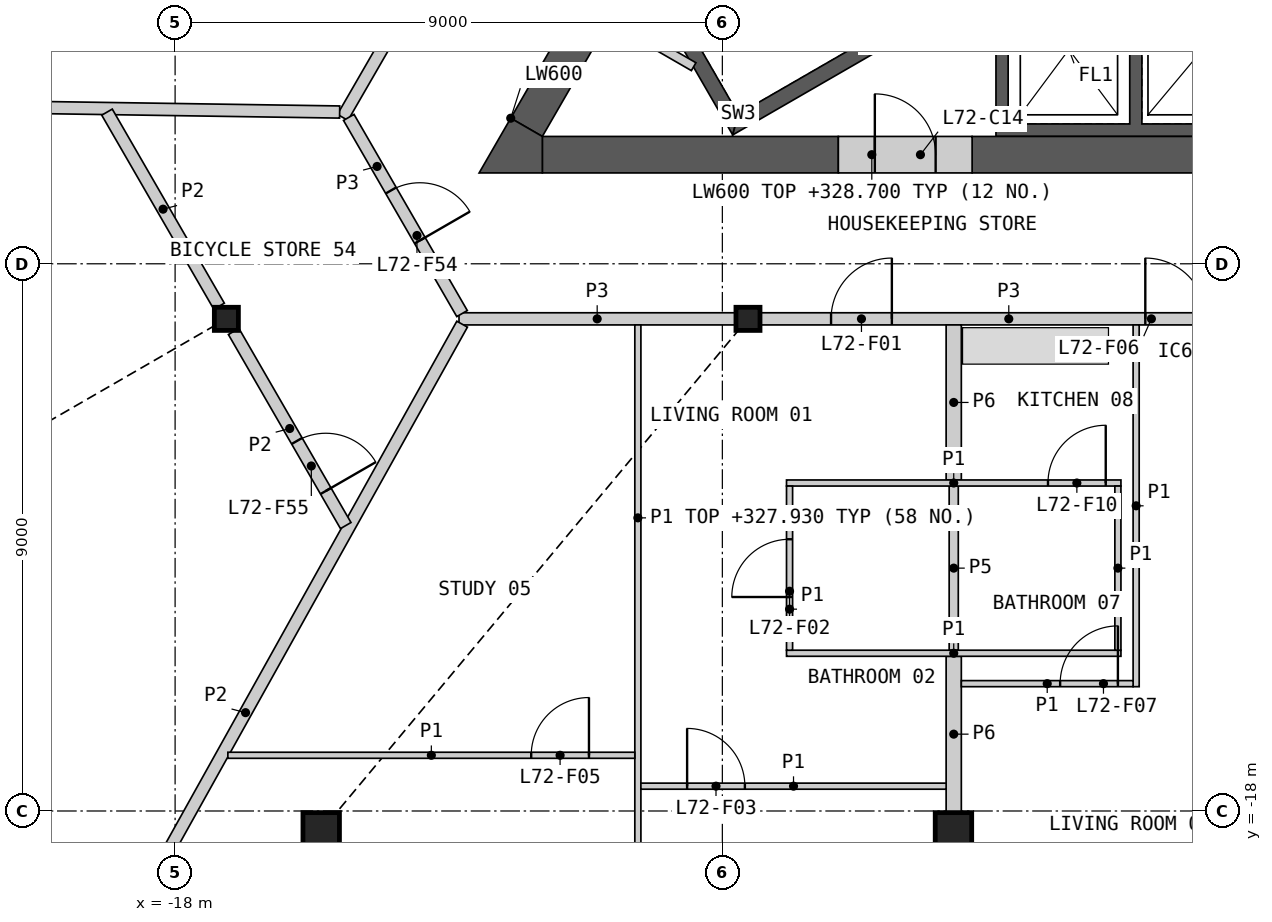
"""IFC4 building model, lengths in metres.
Left out: names, types, materials, properties, quantities, classifications, styles, units other than length and angle.
Written with IfcOpenShell. Run it as: python <this file> out.ifc"""

import sys

from ifc_helpers import new_model, si_unit, direction, frame, frame_2d, origin, origin_2d, place, context, subcontext, project, spatial, polyline, rectangle, hollow_rectangle, i_section, outline, extrude, element, fill, save


model = new_model("IFC4")
c1 = context("Model", 3, precision=1e-05, world=origin(), true_north=direction((0.0, 1.0)))
c2 = subcontext(c1, "Body", "Model", "MODEL_VIEW")
j1 = project(units=[si_unit("LENGTHUNIT", "METRE"), si_unit("PLANEANGLEUNIT", "RADIAN")], contexts=[c1])
p1 = place(None, origin())
s1 = spatial("IfcSite", under=j1, at=p1, CompositionType="ELEMENT")
p2 = place(p1, origin())
s2 = spatial("IfcBuilding", under=s1, at=p2, CompositionType="ELEMENT")
p3 = place(p2, frame((0.0, 0.0, 325.6)))
s3 = spatial("IfcBuildingStorey", under=s2, at=p3, CompositionType="ELEMENT", Elevation=325.6)
for number, where, z_axis, x_axis in (
    (1, (-15.597, -18.327, 0.0), (0.0, 0.0, 1.0), (1.0, 0.0, 0.0)),
    (2, (-5.199, -18.327, 0.0), (0.0, 0.0, 1.0), (1.0, 0.0, 0.0)),
):
    element("IfcColumn", number, at=place(p3, frame(where, z_axis=z_axis, x_axis=x_axis)), inside=s3, PredefinedType="COLUMN", context=c2, shape_type="SweptSolid", body=[
        extrude(hollow_rectangle(XDim=0.6, YDim=0.6, WallThickness=0.04, at=origin_2d()), origin(), (0.0, 0.0, 1.0), 3.4),
    ])
for number, where, z_axis, x_axis in (
    (3, (-17.157, -9.906, 0.0), (0.0, 0.0, 1.0), (1.0, 0.0, 0.0)),
    (4, (-8.578, -9.906, 0.0), (0.0, 0.0, 1.0), (1.0, 0.0, 0.0)),
):
    element("IfcColumn", number, at=place(p3, frame(where, z_axis=z_axis, x_axis=x_axis)), inside=s3, PredefinedType="COLUMN", context=c2, shape_type="SweptSolid", body=[
        extrude(i_section(OverallWidth=0.396, OverallDepth=0.381, WebThickness=0.019, FlangeThickness=0.03, at=origin_2d()), origin(), (0.0, 0.0, 1.0), 3.4),
    ])
p4 = place(p3, origin())
e5 = element("IfcWall", 5, at=p4, inside=s3, PredefinedType="SHEAR", context=c2, shape_type="SweptSolid", body=[
    extrude(outline(polyline([(4.5, -4.4), (4.5, -6.906), (-4.5, -6.906), (-4.5, -4.4), (-4.3, -4.4), (-4.3, -6.7), (-2.3, -6.7), (-2.3, -4.4), (-2.1, -4.4), (-2.1, -6.7), (-0.1, -6.7), (-0.1, -4.4), (0.1, -4.4), (0.1, -6.7), (2.1, -6.7), (2.1, -4.4), (2.3, -4.4), (2.3, -6.7), (4.3, -6.7), (4.3, -4.4), (4.5, -4.4)])), origin(), (0.0, 0.0, 1.0), 3.1),
])
p5 = place(p3, origin())
e6 = element("IfcWall", 6, at=p5, inside=s3, PredefinedType="SHEAR", context=c2, shape_type="SweptSolid", body=[
    extrude(outline(polyline([(-10.374, -4.206), (-8.83, -6.881), (-8.738, -6.539), (-10.032, -4.298), (-10.374, -4.206)])), origin(), (0.0, 0.0, 1.0), 3.1),
])
p6 = place(p3, origin())
e7 = element("IfcWall", 7, at=p6, inside=s3, PredefinedType="SHEAR", context=c2, shape_type="SweptSolid", body=[
    extrude(outline(polyline([(-8.738, -6.539), (-8.83, -6.881), (-3.763, -3.956), (-3.888, -3.739), (-8.738, -6.539)])), origin(), (0.0, 0.0, 1.0), 3.1),
])
p7 = place(p3, frame((-10.842, -4.967, 0.0), z_axis=(0.0, 0.0, 1.0), x_axis=(0.866098216386, -0.499873863663, 0.0)))
e8 = element("IfcWall", 8, at=p7, inside=s3, PredefinedType="PARTITIONING", context=c2, shape_type="SweptSolid", body=[
    extrude(rectangle(XDim=1.582, YDim=0.15, at=frame_2d((0.791, 0.0))), origin(), (0.0, 0.0, 1.0), 3.1),
])
p8 = place(p3, frame((-4.892, -7.206, 0.0), z_axis=(0.0, 0.0, 1.0), x_axis=(1.0, 0.0, 0.0)))
e9 = element("IfcWall", 9, at=p8, inside=s3, PredefinedType="SHEAR", context=c2, shape_type="SweptSolid", body=[
    extrude(rectangle(XDim=16.853, YDim=0.6, at=frame_2d((8.426, 0.0))), origin(), (0.0, 0.0, 1.0), 3.1),
])
p9 = place(p3, frame((-11.961, -7.206, 0.0), z_axis=(0.0, 0.0, 1.0), x_axis=(1.0, 0.0, 0.0)))
e10 = element("IfcWall", 10, at=p9, inside=s3, PredefinedType="SHEAR", context=c2, shape_type="SweptSolid", body=[
    extrude(rectangle(XDim=4.868, YDim=0.6, at=frame_2d((2.434, 0.0))), origin(), (0.0, 0.0, 1.0), 3.1),
])
p10 = place(p3, frame((-9.941, -2.807, 0.0), z_axis=(0.0, 0.0, 1.0), x_axis=(-0.500020646047, -0.866013483456, 0.0)))
e11 = element("IfcWall", 11, at=p10, inside=s3, PredefinedType="SHEAR", context=c2, shape_type="SweptSolid", body=[
    extrude(rectangle(XDim=4.559, YDim=0.6, at=frame_2d((2.28, 0.0))), origin(), (0.0, 0.0, 1.0), 3.1),
])
p11 = place(p3, origin())
e12 = element("IfcWall", 12, at=p11, inside=s3, PredefinedType="SHEAR", context=c2, shape_type="SweptSolid", body=[
    extrude(outline(polyline([(-12.48, -6.606), (-11.961, -6.906), (-11.961, -7.506), (-13.0, -7.506), (-12.48, -6.606)])), origin(), (0.0, 0.0, 1.0), 3.1),
])
p12 = place(p3, frame((-7.092, -7.206, 0.0), z_axis=(0.0, 0.0, 1.0), x_axis=(1.0, 0.0, 0.0)))
e13 = element("IfcWall", 13, at=p12, inside=s3, PredefinedType="SHEAR", context=c2, shape_type="SweptSolid", body=[
    extrude(rectangle(XDim=2.2, YDim=0.6, at=frame_2d((1.1, 0.0))), origin(), (0.0, 0.0, 1.0), 3.1),
])
p13 = place(p12, frame((0.6, 0.0, 0.0)))
e14 = element("IfcOpeningElement", 14, at=p13, cuts=e13, PredefinedType="OPENING", context=c2, shape_type="SweptSolid", body=[
    extrude(rectangle(XDim=1.0, YDim=2.1, at=frame_2d((0.5, 1.05))), frame((0.0, 0.31, 0.0), z_axis=(0.0, -1.0, 0.0), x_axis=(1.0, 0.0, 0.0)), (0.0, 0.0, 1.0), 0.62),
])
p14 = place(p3, frame((-8.371, -9.906, 0.0), z_axis=(0.0, 0.0, 1.0), x_axis=(1.0, 0.0, 0.0)))
e15 = element("IfcWall", 15, at=p14, inside=s3, PredefinedType="PARTITIONING", context=c2, shape_type="SweptSolid", body=[
    extrude(rectangle(XDim=8.163, YDim=0.2, at=frame_2d((4.082, 0.0))), origin(), (0.0, 0.0, 1.0), 3.1),
])
p15 = place(p14, frame((1.159, 0.0, 0.0)))
e16 = element("IfcOpeningElement", 16, at=p15, cuts=e15, PredefinedType="OPENING", context=c2, shape_type="SweptSolid", body=[
    extrude(rectangle(XDim=1.0, YDim=2.1, at=frame_2d((0.5, 1.05))), frame((0.0, 0.11, 0.0), z_axis=(0.0, -1.0, 0.0), x_axis=(1.0, 0.0, 0.0)), (0.0, 0.0, 1.0), 0.22),
])
p16 = place(p14, frame((6.327, 0.0, 0.0)))
e17 = element("IfcOpeningElement", 17, at=p16, cuts=e15, PredefinedType="OPENING", context=c2, shape_type="SweptSolid", body=[
    extrude(rectangle(XDim=1.0, YDim=2.1, at=frame_2d((0.5, 1.05))), frame((0.0, 0.11, 0.0), z_axis=(0.0, -1.0, 0.0), x_axis=(1.0, 0.0, 0.0)), (0.0, 0.0, 1.0), 0.22),
])
p17 = place(p3, frame((-13.331, -9.906, 0.0), z_axis=(0.0, 0.0, 1.0), x_axis=(1.0, 0.0, 0.0)))
e18 = element("IfcWall", 18, at=p17, inside=s3, PredefinedType="PARTITIONING", context=c2, shape_type="SweptSolid", body=[
    extrude(rectangle(XDim=4.545, YDim=0.2, at=frame_2d((2.272, 0.0))), origin(), (0.0, 0.0, 1.0), 3.1),
])
p18 = place(p3, frame((-15.244, -6.592, 0.0), z_axis=(0.0, 0.0, 1.0), x_axis=(0.49999094734, 0.866030630277, 0.0)))
e19 = element("IfcWall", 19, at=p18, inside=s3, PredefinedType="PARTITIONING", context=c2, shape_type="SweptSolid", body=[
    extrude(rectangle(XDim=4.513, YDim=0.2, at=frame_2d((2.256, 0.0))), origin(), (0.0, 0.0, 1.0), 3.1),
])
p19 = place(p3, frame((-15.144, -6.592, 0.0), z_axis=(0.0, 0.0, 1.0), x_axis=(0.499958791762, -0.866049194065, 0.0)))
e20 = element("IfcWall", 20, at=p19, inside=s3, PredefinedType="PARTITIONING", context=c2, shape_type="SweptSolid", body=[
    extrude(rectangle(XDim=3.726, YDim=0.2, at=frame_2d((1.863, 0.0))), origin(), (0.0, 0.0, 1.0), 3.1),
])
p20 = place(p19, frame((1.388, 0.0, 0.0)))
e21 = element("IfcOpeningElement", 21, at=p20, cuts=e20, PredefinedType="OPENING", context=c2, shape_type="SweptSolid", body=[
    extrude(rectangle(XDim=0.95, YDim=2.1, at=frame_2d((0.475, 1.05))), frame((0.0, 0.11, 0.0), z_axis=(0.0, -1.0, 0.0), x_axis=(1.0, 0.0, 0.0)), (0.0, 0.0, 1.0), 0.22),
])
p21 = place(p3, frame((-5.195, -12.556, 0.0), z_axis=(0.0, 0.0, 1.0), x_axis=(0.0, 1.0, 0.0)))
e22 = element("IfcWall", 22, at=p21, inside=s3, PredefinedType="PARTITIONING", context=c2, shape_type="SweptSolid", body=[
    extrude(rectangle(XDim=2.55, YDim=0.25, at=frame_2d((1.275, 0.0))), origin(), (0.0, 0.0, 1.0), 2.33),
])
p22 = place(p3, frame((-5.195, -18.017, 0.0), z_axis=(0.0, 0.0, 1.0), x_axis=(0.0, 1.0, 0.0)))
e23 = element("IfcWall", 23, at=p22, inside=s3, PredefinedType="PARTITIONING", context=c2, shape_type="SweptSolid", body=[
    extrude(rectangle(XDim=2.561, YDim=0.25, at=frame_2d((1.281, 0.0))), origin(), (0.0, 0.0, 1.0), 2.33),
])
p23 = place(p3, frame((-20.404, -22.772, 0.0), z_axis=(0.0, 0.0, 1.0), x_axis=(0.486917529285, 0.873447949036, 0.0)))
e24 = element("IfcWall", 24, at=p23, inside=s3, PredefinedType="PARTITIONING", context=c2, shape_type="SweptSolid", body=[
    extrude(rectangle(XDim=14.631, YDim=0.2, at=frame_2d((7.315, 0.0))), origin(), (0.0, 0.0, 1.0), 2.33),
])
p24 = place(p3, frame((-30.014, -6.282, 0.0), z_axis=(0.0, 0.0, 1.0), x_axis=(0.99988686643, -0.015041753265, 0.0)))
e25 = element("IfcWall", 25, at=p24, inside=s3, PredefinedType="PARTITIONING", context=c2, shape_type="SweptSolid", body=[
    extrude(rectangle(XDim=14.721, YDim=0.2, at=frame_2d((7.361, 0.0))), origin(), (0.0, 0.0, 1.0), 2.33),
])
p25 = place(p3, frame((-17.037, -10.113, 0.0), z_axis=(0.0, 0.0, 1.0), x_axis=(0.50002820729, -0.866009117685, 0.0)))
e26 = element("IfcWall", 26, at=p25, inside=s3, PredefinedType="PARTITIONING", context=c2, shape_type="SweptSolid", body=[
    extrude(rectangle(XDim=3.686, YDim=0.2, at=frame_2d((1.843, 0.0))), origin(), (0.0, 0.0, 1.0), 2.33),
])
p26 = place(p25, frame((2.08, 0.0, 0.0)))
e27 = element("IfcOpeningElement", 27, at=p26, cuts=e26, PredefinedType="OPENING", context=c2, shape_type="SweptSolid", body=[
    extrude(rectangle(XDim=0.95, YDim=2.1, at=frame_2d((0.475, 1.05))), frame((0.0, 0.11, 0.0), z_axis=(0.0, -1.0, 0.0), x_axis=(1.0, 0.0, 0.0)), (0.0, 0.0, 1.0), 0.22),
])
p27 = place(p3, frame((-19.12, -6.506, 0.0), z_axis=(0.0, 0.0, 1.0), x_axis=(0.499978535015, -0.866037796245, 0.0)))
e28 = element("IfcWall", 28, at=p27, inside=s3, PredefinedType="PARTITIONING", context=c2, shape_type="SweptSolid", body=[
    extrude(rectangle(XDim=3.686, YDim=0.2, at=frame_2d((1.843, 0.0))), origin(), (0.0, 0.0, 1.0), 2.33),
])
p28 = place(p3, frame((-5.195, -15.356, 0.0), z_axis=(0.0, 0.0, 1.0), x_axis=(0.0, 1.0, 0.0)))
e29 = element("IfcWall", 29, at=p28, inside=s3, PredefinedType="PLUMBINGWALL", context=c2, shape_type="SweptSolid", body=[
    extrude(rectangle(XDim=2.7, YDim=0.15, at=frame_2d((1.35, 0.0))), origin(), (0.0, 0.0, 1.0), 2.33),
])
p29 = place(p3, frame((-10.389, -22.698, 0.0), z_axis=(0.0, 0.0, 1.0), x_axis=(0.0, 1.0, 0.0)))
e30 = element("IfcWall", 30, at=p29, inside=s3, PredefinedType="PARTITIONING", context=c2, shape_type="SweptSolid", body=[
    extrude(rectangle(XDim=12.692, YDim=0.1, at=frame_2d((6.346, 0.0))), origin(), (0.0, 0.0, 1.0), 2.33),
])
p30 = place(p29, frame((1.153, 0.0, 0.0)))
e31 = element("IfcOpeningElement", 31, at=p30, cuts=e30, PredefinedType="OPENING", context=c2, shape_type="SweptSolid", body=[
    extrude(rectangle(XDim=0.95, YDim=2.1, at=frame_2d((0.475, 1.05))), frame((0.0, 0.06, 0.0), z_axis=(0.0, -1.0, 0.0), x_axis=(1.0, 0.0, 0.0)), (0.0, 0.0, 1.0), 0.12),
])
p31 = place(p3, frame((-23.361, -6.295, 0.0), z_axis=(0.0, 0.0, 1.0), x_axis=(0.499987686533, 0.866032512851, 0.0)))
e32 = element("IfcWall", 32, at=p31, inside=s3, PredefinedType="PARTITIONING", context=c2, shape_type="SweptSolid", body=[
    extrude(rectangle(XDim=6.693, YDim=0.1, at=frame_2d((3.347, 0.0))), origin(), (0.0, 0.0, 1.0), 2.33),
])
p32 = place(p31, frame((3.275, 0.0, 0.0)))
e33 = element("IfcOpeningElement", 33, at=p32, cuts=e32, PredefinedType="OPENING", context=c2, shape_type="SweptSolid", body=[
    extrude(rectangle(XDim=0.95, YDim=2.1, at=frame_2d((0.475, 1.05))), frame((0.0, 0.06, 0.0), z_axis=(0.0, -1.0, 0.0), x_axis=(1.0, 0.0, 0.0)), (0.0, 0.0, 1.0), 0.12),
])
p33 = place(p3, frame((-17.132, -17.084, 0.0), z_axis=(0.0, 0.0, 1.0), x_axis=(1.0, 0.0, 0.0)))
e34 = element("IfcWall", 34, at=p33, inside=s3, PredefinedType="PARTITIONING", context=c2, shape_type="SweptSolid", body=[
    extrude(rectangle(XDim=6.693, YDim=0.1, at=frame_2d((3.346, 0.0))), origin(), (0.0, 0.0, 1.0), 2.33),
])
p34 = place(p33, frame((4.989, 0.0, 0.0)))
e35 = element("IfcOpeningElement", 35, at=p34, cuts=e34, PredefinedType="OPENING", context=c2, shape_type="SweptSolid", body=[
    extrude(rectangle(XDim=0.95, YDim=2.1, at=frame_2d((0.475, 1.05))), frame((0.0, 0.06, 0.0), z_axis=(0.0, -1.0, 0.0), x_axis=(1.0, 0.0, 0.0)), (0.0, 0.0, 1.0), 0.12),
])
p35 = place(p3, frame((-2.195, -15.956, 0.0), z_axis=(0.0, 0.0, 1.0), x_axis=(0.0, 1.0, 0.0)))
e36 = element("IfcWall", 36, at=p35, inside=s3, PredefinedType="PARTITIONING", context=c2, shape_type="SweptSolid", body=[
    extrude(rectangle(XDim=5.95, YDim=0.1, at=frame_2d((2.975, 0.0))), origin(), (0.0, 0.0, 1.0), 2.33),
])
p36 = place(p3, frame((-7.945, -12.606, 0.0), z_axis=(0.0, 0.0, 1.0), x_axis=(1.0, 0.0, 0.0)))
e37 = element("IfcWall", 37, at=p36, inside=s3, PredefinedType="PARTITIONING", context=c2, shape_type="SweptSolid", body=[
    extrude(rectangle(XDim=5.5, YDim=0.1, at=frame_2d((2.75, 0.0))), origin(), (0.0, 0.0, 1.0), 2.33),
])
p37 = place(p36, frame((4.3, 0.0, 0.0)))
e38 = element("IfcOpeningElement", 38, at=p37, cuts=e37, PredefinedType="OPENING", context=c2, shape_type="SweptSolid", body=[
    extrude(rectangle(XDim=0.95, YDim=2.1, at=frame_2d((0.475, 1.05))), frame((0.0, 0.06, 0.0), z_axis=(0.0, -1.0, 0.0), x_axis=(1.0, 0.0, 0.0)), (0.0, 0.0, 1.0), 0.12),
])
p38 = place(p3, frame((-7.945, -15.406, 0.0), z_axis=(0.0, 0.0, 1.0), x_axis=(1.0, 0.0, 0.0)))
e39 = element("IfcWall", 39, at=p38, inside=s3, PredefinedType="PARTITIONING", context=c2, shape_type="SweptSolid", body=[
    extrude(rectangle(XDim=5.5, YDim=0.1, at=frame_2d((2.75, 0.0))), origin(), (0.0, 0.0, 1.0), 2.33),
])
p39 = place(p3, frame((-10.339, -17.592, 0.0), z_axis=(0.0, 0.0, 1.0), x_axis=(1.0, 0.0, 0.0)))
e40 = element("IfcWall", 40, at=p39, inside=s3, PredefinedType="PARTITIONING", context=c2, shape_type="SweptSolid", body=[
    extrude(rectangle(XDim=5.02, YDim=0.1, at=frame_2d((2.51, 0.0))), origin(), (0.0, 0.0, 1.0), 2.33),
])
p40 = place(p39, frame((0.76, 0.0, 0.0)))
e41 = element("IfcOpeningElement", 41, at=p40, cuts=e40, PredefinedType="OPENING", context=c2, shape_type="SweptSolid", body=[
    extrude(rectangle(XDim=0.95, YDim=2.1, at=frame_2d((0.475, 1.05))), frame((0.0, 0.06, 0.0), z_axis=(0.0, -1.0, 0.0), x_axis=(1.0, 0.0, 0.0)), (0.0, 0.0, 1.0), 0.12),
])
p41 = place(p3, frame((-5.07, -15.906, 0.0), z_axis=(0.0, 0.0, 1.0), x_axis=(1.0, 0.0, 0.0)))
e42 = element("IfcWall", 42, at=p41, inside=s3, PredefinedType="PARTITIONING", context=c2, shape_type="SweptSolid", body=[
    extrude(rectangle(XDim=2.825, YDim=0.1, at=frame_2d((1.413, 0.0))), origin(), (0.0, 0.0, 1.0), 2.33),
])
p42 = place(p41, frame((1.625, 0.0, 0.0)))
e43 = element("IfcOpeningElement", 43, at=p42, cuts=e42, PredefinedType="OPENING", context=c2, shape_type="SweptSolid", body=[
    extrude(rectangle(XDim=0.95, YDim=2.1, at=frame_2d((0.475, 1.05))), frame((0.0, 0.06, 0.0), z_axis=(0.0, -1.0, 0.0), x_axis=(1.0, 0.0, 0.0)), (0.0, 0.0, 1.0), 0.12),
])
p43 = place(p3, frame((-7.895, -15.356, 0.0), z_axis=(0.0, 0.0, 1.0), x_axis=(0.0, 1.0, 0.0)))
e44 = element("IfcWall", 44, at=p43, inside=s3, PredefinedType="PARTITIONING", context=c2, shape_type="SweptSolid", body=[
    extrude(rectangle(XDim=2.7, YDim=0.1, at=frame_2d((1.35, 0.0))), origin(), (0.0, 0.0, 1.0), 2.33),
])
p44 = place(p43, frame((0.875, 0.0, 0.0)))
e45 = element("IfcOpeningElement", 45, at=p44, cuts=e44, PredefinedType="OPENING", context=c2, shape_type="SweptSolid", body=[
    extrude(rectangle(XDim=0.95, YDim=2.1, at=frame_2d((0.475, 1.05))), frame((0.0, 0.06, 0.0), z_axis=(0.0, -1.0, 0.0), x_axis=(1.0, 0.0, 0.0)), (0.0, 0.0, 1.0), 0.12),
])
p45 = place(p3, frame((-2.495, -15.356, 0.0), z_axis=(0.0, 0.0, 1.0), x_axis=(0.0, 1.0, 0.0)))
e46 = element("IfcWall", 46, at=p45, inside=s3, PredefinedType="PARTITIONING", context=c2, shape_type="SweptSolid", body=[
    extrude(rectangle(XDim=2.7, YDim=0.1, at=frame_2d((1.35, 0.0))), origin(), (0.0, 0.0, 1.0), 2.33),
])
p46 = place(p13, origin())
e47 = element("IfcDoor", 47, at=p46, inside=s3, OperationType="SINGLE_SWING_LEFT", PredefinedType="DOOR", context=c2, shape_type="SweptSolid", body=[
    extrude(rectangle(XDim=1.0, YDim=2.1, at=frame_2d((0.5, 1.05))), frame((0.0, 0.055, 0.0), z_axis=(0.0, -1.0, 0.0), x_axis=(1.0, 0.0, 0.0)), (0.0, 0.0, 1.0), 0.05),
])
fill(e14, e47)
p47 = place(p15, origin())
e48 = element("IfcDoor", 48, at=p47, inside=s3, OperationType="SINGLE_SWING_RIGHT", PredefinedType="DOOR", context=c2, shape_type="SweptSolid", body=[
    extrude(rectangle(XDim=1.0, YDim=2.1, at=frame_2d((0.5, 1.05))), frame((0.0, 0.025, 0.0), z_axis=(0.0, -1.0, 0.0), x_axis=(1.0, 0.0, 0.0)), (0.0, 0.0, 1.0), 0.05),
])
fill(e16, e48)
p48 = place(p44, origin())
e49 = element("IfcDoor", 49, at=p48, inside=s3, OperationType="SINGLE_SWING_LEFT", PredefinedType="DOOR", context=c2, shape_type="SweptSolid", body=[
    extrude(rectangle(XDim=0.95, YDim=2.1, at=frame_2d((0.475, 1.05))), frame((0.0, 0.025, 0.0), z_axis=(0.0, -1.0, 0.0), x_axis=(1.0, 0.0, 0.0)), (0.0, 0.0, 1.0), 0.05),
])
fill(e45, e49)
p49 = place(p40, origin())
e50 = element("IfcDoor", 50, at=p49, inside=s3, OperationType="SINGLE_SWING_LEFT", PredefinedType="DOOR", context=c2, shape_type="SweptSolid", body=[
    extrude(rectangle(XDim=0.95, YDim=2.1, at=frame_2d((0.475, 1.05))), frame((0.0, 0.025, 0.0), z_axis=(0.0, -1.0, 0.0), x_axis=(1.0, 0.0, 0.0)), (0.0, 0.0, 1.0), 0.05),
])
fill(e41, e50)
p50 = place(p34, origin())
e51 = element("IfcDoor", 51, at=p50, inside=s3, OperationType="SINGLE_SWING_RIGHT", PredefinedType="DOOR", context=c2, shape_type="SweptSolid", body=[
    extrude(rectangle(XDim=0.95, YDim=2.1, at=frame_2d((0.475, 1.05))), frame((0.0, 0.025, 0.0), z_axis=(0.0, -1.0, 0.0), x_axis=(1.0, 0.0, 0.0)), (0.0, 0.0, 1.0), 0.05),
])
fill(e35, e51)
p51 = place(p16, origin())
e52 = element("IfcDoor", 52, at=p51, inside=s3, OperationType="SINGLE_SWING_LEFT", PredefinedType="DOOR", context=c2, shape_type="SweptSolid", body=[
    extrude(rectangle(XDim=1.0, YDim=2.1, at=frame_2d((0.5, 1.05))), frame((0.0, 0.025, 0.0), z_axis=(0.0, -1.0, 0.0), x_axis=(1.0, 0.0, 0.0)), (0.0, 0.0, 1.0), 0.05),
])
fill(e17, e52)
p52 = place(p42, origin())
e53 = element("IfcDoor", 53, at=p52, inside=s3, OperationType="SINGLE_SWING_RIGHT", PredefinedType="DOOR", context=c2, shape_type="SweptSolid", body=[
    extrude(rectangle(XDim=0.95, YDim=2.1, at=frame_2d((0.475, 1.05))), frame((0.0, 0.025, 0.0), z_axis=(0.0, -1.0, 0.0), x_axis=(1.0, 0.0, 0.0)), (0.0, 0.0, 1.0), 0.05),
])
fill(e43, e53)
p53 = place(p37, origin())
e54 = element("IfcDoor", 54, at=p53, inside=s3, OperationType="SINGLE_SWING_RIGHT", PredefinedType="DOOR", context=c2, shape_type="SweptSolid", body=[
    extrude(rectangle(XDim=0.95, YDim=2.1, at=frame_2d((0.475, 1.05))), frame((0.0, 0.025, 0.0), z_axis=(0.0, -1.0, 0.0), x_axis=(1.0, 0.0, 0.0)), (0.0, 0.0, 1.0), 0.05),
])
fill(e38, e54)
p54 = place(p20, origin())
e55 = element("IfcDoor", 55, at=p54, inside=s3, OperationType="SINGLE_SWING_RIGHT", PredefinedType="DOOR", context=c2, shape_type="SweptSolid", body=[
    extrude(rectangle(XDim=0.95, YDim=2.1, at=frame_2d((0.475, 1.05))), frame((0.0, 0.025, 0.0), z_axis=(0.0, -1.0, 0.0), x_axis=(1.0, 0.0, 0.0)), (0.0, 0.0, 1.0), 0.05),
])
fill(e21, e55)
p55 = place(p26, origin())
e56 = element("IfcDoor", 56, at=p55, inside=s3, OperationType="SINGLE_SWING_RIGHT", PredefinedType="DOOR", context=c2, shape_type="SweptSolid", body=[
    extrude(rectangle(XDim=0.95, YDim=2.1, at=frame_2d((0.475, 1.05))), frame((0.0, 0.025, 0.0), z_axis=(0.0, -1.0, 0.0), x_axis=(1.0, 0.0, 0.0)), (0.0, 0.0, 1.0), 0.05),
])
fill(e27, e56)
save(model, sys.argv[1])
